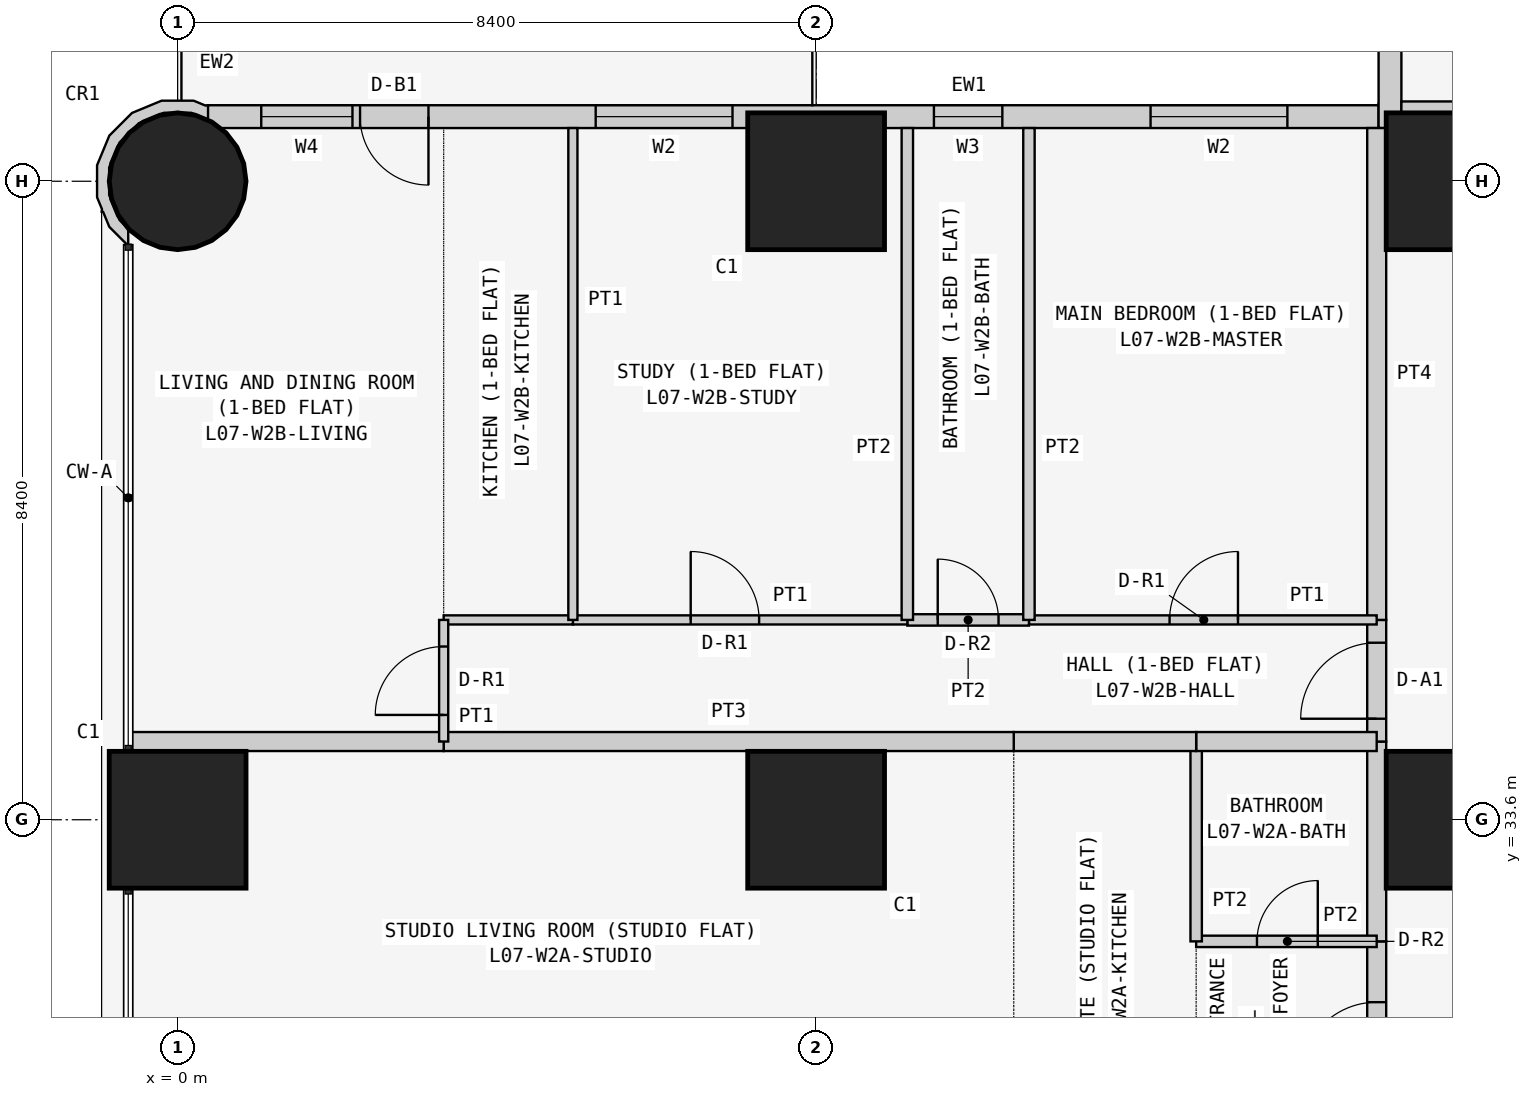
"""IFC4 building model, lengths in metres.
Left out: names, types, materials, properties, quantities, classifications, styles, units other than length and angle.
Written with IfcOpenShell. Run it as: python <this file> out.ifc"""

import sys

from ifc_helpers import new_model, si_unit, direction, frame, frame_2d, origin, origin_2d, place, context, subcontext, project, spatial, polyline, rectangle, circle, outline, extrude, element, fill, save


model = new_model("IFC4")
c1 = context("Model", 3, precision=1e-05, world=origin(), true_north=direction((0.0, 1.0)))
c2 = subcontext(c1, "Body", "Model", "MODEL_VIEW")
j1 = project(units=[si_unit("LENGTHUNIT", "METRE"), si_unit("PLANEANGLEUNIT", "RADIAN")], contexts=[c1])
p1 = place(None, origin())
s1 = spatial("IfcSite", under=j1, at=p1, CompositionType="ELEMENT")
p2 = place(p1, origin())
s2 = spatial("IfcBuilding", under=s1, at=p2, CompositionType="ELEMENT")
p3 = place(p2, frame((0.0, 0.0, 34.5)))
s3 = spatial("IfcBuildingStorey", under=s2, at=p3, CompositionType="ELEMENT", Elevation=34.5)
p4 = place(p3, frame((0.0, 33.6, 0.0), z_axis=(0.0, 0.0, 1.0), x_axis=(1.0, 0.0, 0.0)))
e1 = element("IfcColumn", 1, at=p4, inside=s3, PredefinedType="COLUMN", context=c2, shape_type="SweptSolid", body=[
    extrude(rectangle(XDim=1.8, YDim=1.8, at=origin_2d()), origin(), (0.0, 0.0, 1.0), 3.6),
])
p5 = place(p3, frame((0.0, 42.0, 0.0), z_axis=(0.0, 0.0, 1.0), x_axis=(1.0, 0.0, 0.0)))
e2 = element("IfcColumn", 2, at=p5, inside=s3, PredefinedType="COLUMN", context=c2, shape_type="SweptSolid", body=[
    extrude(circle(Radius=0.9, at=origin_2d()), origin(), (0.0, 0.0, 1.0), 3.6),
])
for number, where, z_axis, x_axis in (
    (3, (8.4, 33.6, 0.0), (0.0, 0.0, 1.0), (1.0, 0.0, 0.0)),
    (4, (8.4, 42.0, 0.0), (0.0, 0.0, 1.0), (1.0, 0.0, 0.0)),
    (5, (16.8, 33.6, 0.0), (0.0, 0.0, 1.0), (1.0, 0.0, 0.0)),
    (6, (16.8, 42.0, 0.0), (0.0, 0.0, 1.0), (1.0, 0.0, 0.0)),
):
    element("IfcColumn", number, at=place(p3, frame(where, z_axis=z_axis, x_axis=x_axis)), inside=s3, PredefinedType="COLUMN", context=c2, shape_type="SweptSolid", body=[
        extrude(rectangle(XDim=1.8, YDim=1.8, at=origin_2d()), origin(), (0.0, 0.0, 1.0), 3.6),
    ])
p6 = place(p3, frame((15.8, 42.85, 0.0), z_axis=(0.0, 0.0, 1.0), x_axis=(-1.0, 0.0, 0.0)))
e7 = element("IfcWall", 7, at=p6, inside=s3, PredefinedType="SOLIDWALL", context=c2, shape_type="SweptSolid", body=[
    extrude(rectangle(XDim=15.4, YDim=0.3, at=frame_2d((7.7, 0.0))), origin(), (0.0, 0.0, 1.0), 3.45),
])
p7 = place(p6, frame((1.2, 0.0, 0.9)))
e8 = element("IfcOpeningElement", 8, at=p7, cuts=e7, PredefinedType="OPENING", context=c2, shape_type="SweptSolid", body=[
    extrude(rectangle(XDim=1.8, YDim=1.5, at=frame_2d((0.9, 0.75))), frame((0.0, 0.16, 0.0), z_axis=(0.0, -1.0, 0.0), x_axis=(1.0, 0.0, 0.0)), (0.0, 0.0, 1.0), 0.32),
])
p8 = place(p6, frame((4.95, 0.0, 1.5)))
e9 = element("IfcOpeningElement", 9, at=p8, cuts=e7, PredefinedType="OPENING", context=c2, shape_type="SweptSolid", body=[
    extrude(rectangle(XDim=0.9, YDim=0.7, at=frame_2d((0.45, 0.35))), frame((0.0, 0.16, 0.0), z_axis=(0.0, -1.0, 0.0), x_axis=(1.0, 0.0, 0.0)), (0.0, 0.0, 1.0), 0.32),
])
p9 = place(p6, frame((8.5, 0.0, 0.9)))
e10 = element("IfcOpeningElement", 10, at=p9, cuts=e7, PredefinedType="OPENING", context=c2, shape_type="SweptSolid", body=[
    extrude(rectangle(XDim=1.8, YDim=1.5, at=frame_2d((0.9, 0.75))), frame((0.0, 0.16, 0.0), z_axis=(0.0, -1.0, 0.0), x_axis=(1.0, 0.0, 0.0)), (0.0, 0.0, 1.0), 0.32),
])
p10 = place(p6, frame((12.5, 0.0, 0.0)))
e11 = element("IfcOpeningElement", 11, at=p10, cuts=e7, PredefinedType="OPENING", context=c2, shape_type="SweptSolid", body=[
    extrude(rectangle(XDim=0.9, YDim=2.4, at=frame_2d((0.45, 1.2))), frame((0.0, 0.16, 0.0), z_axis=(0.0, -1.0, 0.0), x_axis=(1.0, 0.0, 0.0)), (0.0, 0.0, 1.0), 0.32),
])
p11 = place(p6, frame((13.5, 0.0, 0.9)))
e12 = element("IfcOpeningElement", 12, at=p11, cuts=e7, PredefinedType="OPENING", context=c2, shape_type="SweptSolid", body=[
    extrude(rectangle(XDim=1.2, YDim=1.5, at=frame_2d((0.6, 0.75))), frame((0.0, 0.16, 0.0), z_axis=(0.0, -1.0, 0.0), x_axis=(1.0, 0.0, 0.0)), (0.0, 0.0, 1.0), 0.32),
])
p12 = place(p3, frame((15.95, 58.4, 0.0), z_axis=(0.0, 0.0, 1.0), x_axis=(0.0, -1.0, 0.0)))
e13 = element("IfcWall", 13, at=p12, inside=s3, PredefinedType="SOLIDWALL", context=c2, shape_type="SweptSolid", body=[
    extrude(rectangle(XDim=15.7, YDim=0.3, at=frame_2d((7.85, 0.0))), origin(), (0.0, 0.0, 1.0), 3.45),
])
p13 = place(p12, frame((12.4, 0.0, 0.9)))
e14 = element("IfcOpeningElement", 14, at=p13, cuts=e13, PredefinedType="OPENING", context=c2, shape_type="SweptSolid", body=[
    extrude(rectangle(XDim=1.8, YDim=1.5, at=frame_2d((0.9, 0.75))), frame((0.0, 0.16, 0.0), z_axis=(0.0, -1.0, 0.0), x_axis=(1.0, 0.0, 0.0)), (0.0, 0.0, 1.0), 0.32),
])
p14 = place(p12, frame((9.55, 0.0, 1.5)))
e15 = element("IfcOpeningElement", 15, at=p14, cuts=e13, PredefinedType="OPENING", context=c2, shape_type="SweptSolid", body=[
    extrude(rectangle(XDim=0.9, YDim=0.7, at=frame_2d((0.45, 0.35))), frame((0.0, 0.16, 0.0), z_axis=(0.0, -1.0, 0.0), x_axis=(1.0, 0.0, 0.0)), (0.0, 0.0, 1.0), 0.32),
])
p15 = place(p12, frame((5.1, 0.0, 0.9)))
e16 = element("IfcOpeningElement", 16, at=p15, cuts=e13, PredefinedType="OPENING", context=c2, shape_type="SweptSolid", body=[
    extrude(rectangle(XDim=1.8, YDim=1.5, at=frame_2d((0.9, 0.75))), frame((0.0, 0.16, 0.0), z_axis=(0.0, -1.0, 0.0), x_axis=(1.0, 0.0, 0.0)), (0.0, 0.0, 1.0), 0.32),
])
p16 = place(p12, frame((2.0, 0.0, 0.0)))
e17 = element("IfcOpeningElement", 17, at=p16, cuts=e13, PredefinedType="OPENING", context=c2, shape_type="SweptSolid", body=[
    extrude(rectangle(XDim=0.9, YDim=2.4, at=frame_2d((0.45, 1.2))), frame((0.0, 0.16, 0.0), z_axis=(0.0, -1.0, 0.0), x_axis=(1.0, 0.0, 0.0)), (0.0, 0.0, 1.0), 0.32),
])
p17 = place(p12, frame((0.7, 0.0, 0.9)))
e18 = element("IfcOpeningElement", 18, at=p17, cuts=e13, PredefinedType="OPENING", context=c2, shape_type="SweptSolid", body=[
    extrude(rectangle(XDim=1.2, YDim=1.5, at=frame_2d((0.6, 0.75))), frame((0.0, 0.16, 0.0), z_axis=(0.0, -1.0, 0.0), x_axis=(1.0, 0.0, 0.0)), (0.0, 0.0, 1.0), 0.32),
])
p18 = place(p3, frame((0.364, 42.91, 0.0), z_axis=(0.0, 0.0, 1.0), x_axis=(-0.926129809145, 0.377204953059, 0.0)))
e19 = element("IfcWall", 19, at=p18, inside=s3, PredefinedType="SOLIDWALL", context=c2, shape_type="SweptSolid", body=[
    extrude(outline(polyline([(0.36, 1.803), (0.509, 1.741), (0.761, 1.486), (0.896, 1.154), (0.894, 0.795), (0.755, 0.465), (0.5, 0.213), (0.168, 0.078), (-0.1, 0.08), (0.001, -0.097), (0.03, -0.08), (0.199, -0.081), (0.589, 0.078), (0.889, 0.374), (1.053, 0.763), (1.055, 1.185), (0.896, 1.575), (0.778, 1.695), (0.769, 1.728), (0.75, 1.723), (0.6, 1.875), (0.295, 2.003), (0.281, 1.998), (0.36, 1.803)])), origin(), (0.0, 0.0, 1.0), 3.45),
])
p19 = place(p3, frame((16.1, 42.975, 0.0), z_axis=(0.0, 0.0, 1.0), x_axis=(1.0, 0.0, 0.0)))
e20 = element("IfcWall", 20, at=p19, inside=s3, PredefinedType="PARTITIONING", context=c2, shape_type="SweptSolid", body=[
    extrude(rectangle(XDim=11.557, YDim=0.15, at=frame_2d((5.778, 0.0))), origin(), (0.0, 0.0, 1.0), 3.45),
])
p20 = place(p3, frame((15.775, 29.4, 0.0), z_axis=(0.0, 0.0, 1.0), x_axis=(0.0, 1.0, 0.0)))
e21 = element("IfcWall", 21, at=p20, inside=s3, PredefinedType="PARTITIONING", context=c2, shape_type="SweptSolid", body=[
    extrude(rectangle(XDim=2.6, YDim=0.25, at=frame_2d((1.3, 0.0))), origin(), (0.0, 0.0, 1.0), 3.45),
])
p21 = place(p20, frame((0.8, 0.0, 0.0)))
e22 = element("IfcOpeningElement", 22, at=p21, cuts=e21, PredefinedType="OPENING", context=c2, shape_type="SweptSolid", body=[
    extrude(rectangle(XDim=1.0, YDim=2.1, at=frame_2d((0.5, 1.05))), frame((0.0, 0.135, 0.0), z_axis=(0.0, -1.0, 0.0), x_axis=(1.0, 0.0, 0.0)), (0.0, 0.0, 1.0), 0.27),
])
p22 = place(p3, frame((15.775, 32.0, 0.0), z_axis=(0.0, 0.0, 1.0), x_axis=(0.0, 1.0, 0.0)))
e23 = element("IfcWall", 23, at=p22, inside=s3, PredefinedType="PARTITIONING", context=c2, shape_type="SweptSolid", body=[
    extrude(rectangle(XDim=2.629, YDim=0.25, at=frame_2d((1.314, 0.0))), origin(), (0.0, 0.0, 1.0), 3.45),
])
p23 = place(p3, frame((15.775, 34.629, 0.0), z_axis=(0.0, 0.0, 1.0), x_axis=(0.0, 1.0, 0.0)))
e24 = element("IfcWall", 24, at=p23, inside=s3, PredefinedType="PARTITIONING", context=c2, shape_type="SweptSolid", body=[
    extrude(rectangle(XDim=1.6, YDim=0.25, at=frame_2d((0.8, 0.0))), origin(), (0.0, 0.0, 1.0), 3.45),
])
p24 = place(p23, frame((0.3, 0.0, 0.0)))
e25 = element("IfcOpeningElement", 25, at=p24, cuts=e24, PredefinedType="OPENING", context=c2, shape_type="SweptSolid", body=[
    extrude(rectangle(XDim=1.0, YDim=2.1, at=frame_2d((0.5, 1.05))), frame((0.0, 0.135, 0.0), z_axis=(0.0, -1.0, 0.0), x_axis=(1.0, 0.0, 0.0)), (0.0, 0.0, 1.0), 0.27),
])
p25 = place(p3, frame((15.775, 36.229, 0.0), z_axis=(0.0, 0.0, 1.0), x_axis=(0.0, 1.0, 0.0)))
e26 = element("IfcWall", 26, at=p25, inside=s3, PredefinedType="PARTITIONING", context=c2, shape_type="SweptSolid", body=[
    extrude(rectangle(XDim=6.471, YDim=0.25, at=frame_2d((3.235, 0.0))), origin(), (0.0, 0.0, 1.0), 3.45),
])
p26 = place(p3, frame((13.4, 32.0, 0.0), z_axis=(0.0, 0.0, 1.0), x_axis=(1.0, 0.0, 0.0)))
e27 = element("IfcWall", 27, at=p26, inside=s3, PredefinedType="PARTITIONING", context=c2, shape_type="SweptSolid", body=[
    extrude(rectangle(XDim=2.375, YDim=0.15, at=frame_2d((1.188, 0.0))), origin(), (0.0, 0.0, 1.0), 3.45),
])
p27 = place(p26, frame((0.8, 0.0, 0.0)))
e28 = element("IfcOpeningElement", 28, at=p27, cuts=e27, PredefinedType="OPENING", context=c2, shape_type="SweptSolid", body=[
    extrude(rectangle(XDim=0.8, YDim=2.1, at=frame_2d((0.4, 1.05))), frame((0.0, 0.085, 0.0), z_axis=(0.0, -1.0, 0.0), x_axis=(1.0, 0.0, 0.0)), (0.0, 0.0, 1.0), 0.17),
])
p28 = place(p3, frame((13.4, 32.0, 0.0), z_axis=(0.0, 0.0, 1.0), x_axis=(0.0, 1.0, 0.0)))
e29 = element("IfcWall", 29, at=p28, inside=s3, PredefinedType="PARTITIONING", context=c2, shape_type="SweptSolid", body=[
    extrude(rectangle(XDim=2.629, YDim=0.15, at=frame_2d((1.314, 0.0))), origin(), (0.0, 0.0, 1.0), 3.45),
])
p29 = place(p3, frame((13.4, 34.629, 0.0), z_axis=(0.0, 0.0, 1.0), x_axis=(1.0, 0.0, 0.0)))
e30 = element("IfcWall", 30, at=p29, inside=s3, PredefinedType="PARTITIONING", context=c2, shape_type="SweptSolid", body=[
    extrude(rectangle(XDim=2.375, YDim=0.25, at=frame_2d((1.188, 0.0))), origin(), (0.0, 0.0, 1.0), 3.45),
])
p30 = place(p3, frame((11.0, 34.629, 0.0), z_axis=(0.0, 0.0, 1.0), x_axis=(1.0, 0.0, 0.0)))
e31 = element("IfcWall", 31, at=p30, inside=s3, PredefinedType="PARTITIONING", context=c2, shape_type="SweptSolid", body=[
    extrude(rectangle(XDim=2.4, YDim=0.25, at=frame_2d((1.2, 0.0))), origin(), (0.0, 0.0, 1.0), 3.45),
])
p31 = place(p3, frame((3.5, 34.629, 0.0), z_axis=(0.0, 0.0, 1.0), x_axis=(1.0, 0.0, 0.0)))
e32 = element("IfcWall", 32, at=p31, inside=s3, PredefinedType="PARTITIONING", context=c2, shape_type="SweptSolid", body=[
    extrude(rectangle(XDim=7.5, YDim=0.25, at=frame_2d((3.75, 0.0))), origin(), (0.0, 0.0, 1.0), 3.45),
])
p32 = place(p3, frame((-0.65, 34.629, 0.0), z_axis=(0.0, 0.0, 1.0), x_axis=(1.0, 0.0, 0.0)))
e33 = element("IfcWall", 33, at=p32, inside=s3, PredefinedType="PARTITIONING", context=c2, shape_type="SweptSolid", body=[
    extrude(rectangle(XDim=4.15, YDim=0.25, at=frame_2d((2.075, 0.0))), origin(), (0.0, 0.0, 1.0), 3.45),
])
p33 = place(p3, frame((11.2, 36.229, 0.0), z_axis=(0.0, 0.0, 1.0), x_axis=(1.0, 0.0, 0.0)))
e34 = element("IfcWall", 34, at=p33, inside=s3, PredefinedType="PARTITIONING", context=c2, shape_type="SweptSolid", body=[
    extrude(rectangle(XDim=4.575, YDim=0.12, at=frame_2d((2.288, 0.0))), origin(), (0.0, 0.0, 1.0), 3.45),
])
p34 = place(p33, frame((1.85, 0.0, 0.0)))
e35 = element("IfcOpeningElement", 35, at=p34, cuts=e34, PredefinedType="OPENING", context=c2, shape_type="SweptSolid", body=[
    extrude(rectangle(XDim=0.9, YDim=2.1, at=frame_2d((0.45, 1.05))), frame((0.0, 0.07, 0.0), z_axis=(0.0, -1.0, 0.0), x_axis=(1.0, 0.0, 0.0)), (0.0, 0.0, 1.0), 0.14),
])
p35 = place(p3, frame((9.6, 36.229, 0.0), z_axis=(0.0, 0.0, 1.0), x_axis=(1.0, 0.0, 0.0)))
e36 = element("IfcWall", 36, at=p35, inside=s3, PredefinedType="PARTITIONING", context=c2, shape_type="SweptSolid", body=[
    extrude(rectangle(XDim=1.6, YDim=0.15, at=frame_2d((0.8, 0.0))), origin(), (0.0, 0.0, 1.0), 3.45),
])
p36 = place(p35, frame((0.4, 0.0, 0.0)))
e37 = element("IfcOpeningElement", 37, at=p36, cuts=e36, PredefinedType="OPENING", context=c2, shape_type="SweptSolid", body=[
    extrude(rectangle(XDim=0.8, YDim=2.1, at=frame_2d((0.4, 1.05))), frame((0.0, 0.085, 0.0), z_axis=(0.0, -1.0, 0.0), x_axis=(1.0, 0.0, 0.0)), (0.0, 0.0, 1.0), 0.17),
])
p37 = place(p3, frame((5.2, 36.229, 0.0), z_axis=(0.0, 0.0, 1.0), x_axis=(1.0, 0.0, 0.0)))
e38 = element("IfcWall", 38, at=p37, inside=s3, PredefinedType="PARTITIONING", context=c2, shape_type="SweptSolid", body=[
    extrude(rectangle(XDim=4.4, YDim=0.12, at=frame_2d((2.2, 0.0))), origin(), (0.0, 0.0, 1.0), 3.45),
])
p38 = place(p37, frame((1.55, 0.0, 0.0)))
e39 = element("IfcOpeningElement", 39, at=p38, cuts=e38, PredefinedType="OPENING", context=c2, shape_type="SweptSolid", body=[
    extrude(rectangle(XDim=0.9, YDim=2.1, at=frame_2d((0.45, 1.05))), frame((0.0, 0.07, 0.0), z_axis=(0.0, -1.0, 0.0), x_axis=(1.0, 0.0, 0.0)), (0.0, 0.0, 1.0), 0.14),
])
p39 = place(p3, frame((3.5, 36.229, 0.0), z_axis=(0.0, 0.0, 1.0), x_axis=(1.0, 0.0, 0.0)))
e40 = element("IfcWall", 40, at=p39, inside=s3, PredefinedType="PARTITIONING", context=c2, shape_type="SweptSolid", body=[
    extrude(rectangle(XDim=1.7, YDim=0.12, at=frame_2d((0.85, 0.0))), origin(), (0.0, 0.0, 1.0), 3.45),
])
p40 = place(p3, frame((3.5, 34.629, 0.0), z_axis=(0.0, 0.0, 1.0), x_axis=(0.0, 1.0, 0.0)))
e41 = element("IfcWall", 41, at=p40, inside=s3, PredefinedType="PARTITIONING", context=c2, shape_type="SweptSolid", body=[
    extrude(rectangle(XDim=1.6, YDim=0.12, at=frame_2d((0.8, 0.0))), origin(), (0.0, 0.0, 1.0), 3.45),
])
p41 = place(p40, frame((0.35, 0.0, 0.0)))
e42 = element("IfcOpeningElement", 42, at=p41, cuts=e41, PredefinedType="OPENING", context=c2, shape_type="SweptSolid", body=[
    extrude(rectangle(XDim=0.9, YDim=2.1, at=frame_2d((0.45, 1.05))), frame((0.0, 0.07, 0.0), z_axis=(0.0, -1.0, 0.0), x_axis=(1.0, 0.0, 0.0)), (0.0, 0.0, 1.0), 0.14),
])
for number, where, z_axis, x_axis in (
    (43, (11.2, 36.229, 0.0), (0.0, 0.0, 1.0), (0.0, 1.0, 0.0)),
    (44, (9.6, 36.229, 0.0), (0.0, 0.0, 1.0), (0.0, 1.0, 0.0)),
):
    element("IfcWall", number, at=place(p3, frame(where, z_axis=z_axis, x_axis=x_axis)), inside=s3, PredefinedType="PARTITIONING", context=c2, shape_type="SweptSolid", body=[
        extrude(rectangle(XDim=6.471, YDim=0.15, at=frame_2d((3.235, 0.0))), origin(), (0.0, 0.0, 1.0), 3.45),
    ])
p42 = place(p3, frame((5.2, 36.229, 0.0), z_axis=(0.0, 0.0, 1.0), x_axis=(0.0, 1.0, 0.0)))
e45 = element("IfcWall", 45, at=p42, inside=s3, PredefinedType="PARTITIONING", context=c2, shape_type="SweptSolid", body=[
    extrude(rectangle(XDim=6.471, YDim=0.12, at=frame_2d((3.235, 0.0))), origin(), (0.0, 0.0, 1.0), 3.45),
])
p43 = place(p7, origin())
e46 = element("IfcWindow", 46, at=p43, inside=s3, PartitioningType="SINGLE_PANEL", PredefinedType="WINDOW", context=c2, shape_type="SweptSolid", body=[
    extrude(rectangle(XDim=1.8, YDim=1.5, at=frame_2d((0.9, 0.75))), frame((0.0, 0.03, 0.0), z_axis=(0.0, -1.0, 0.0), x_axis=(1.0, 0.0, 0.0)), (0.0, 0.0, 1.0), 0.06),
])
fill(e8, e46)
p44 = place(p8, origin())
e47 = element("IfcWindow", 47, at=p44, inside=s3, PartitioningType="SINGLE_PANEL", PredefinedType="WINDOW", context=c2, shape_type="SweptSolid", body=[
    extrude(rectangle(XDim=0.9, YDim=0.7, at=frame_2d((0.45, 0.35))), frame((0.0, 0.03, 0.0), z_axis=(0.0, -1.0, 0.0), x_axis=(1.0, 0.0, 0.0)), (0.0, 0.0, 1.0), 0.06),
])
fill(e9, e47)
p45 = place(p9, origin())
e48 = element("IfcWindow", 48, at=p45, inside=s3, PartitioningType="SINGLE_PANEL", PredefinedType="WINDOW", context=c2, shape_type="SweptSolid", body=[
    extrude(rectangle(XDim=1.8, YDim=1.5, at=frame_2d((0.9, 0.75))), frame((0.0, 0.03, 0.0), z_axis=(0.0, -1.0, 0.0), x_axis=(1.0, 0.0, 0.0)), (0.0, 0.0, 1.0), 0.06),
])
fill(e10, e48)
p46 = place(p10, origin())
e49 = element("IfcDoor", 49, at=p46, inside=s3, OperationType="SINGLE_SWING_LEFT", PredefinedType="DOOR", context=c2, shape_type="SweptSolid", body=[
    extrude(rectangle(XDim=0.9, YDim=2.4, at=frame_2d((0.45, 1.2))), frame((0.0, 0.025, 0.0), z_axis=(0.0, -1.0, 0.0), x_axis=(1.0, 0.0, 0.0)), (0.0, 0.0, 1.0), 0.05),
])
fill(e11, e49)
p47 = place(p11, origin())
e50 = element("IfcWindow", 50, at=p47, inside=s3, PartitioningType="SINGLE_PANEL", PredefinedType="WINDOW", context=c2, shape_type="SweptSolid", body=[
    extrude(rectangle(XDim=1.2, YDim=1.5, at=frame_2d((0.6, 0.75))), frame((0.0, 0.03, 0.0), z_axis=(0.0, -1.0, 0.0), x_axis=(1.0, 0.0, 0.0)), (0.0, 0.0, 1.0), 0.06),
])
fill(e12, e50)
p48 = place(p21, origin())
e51 = element("IfcDoor", 51, at=p48, inside=s3, OperationType="SINGLE_SWING_LEFT", PredefinedType="DOOR", context=c2, shape_type="SweptSolid", body=[
    extrude(rectangle(XDim=1.0, YDim=2.1, at=frame_2d((0.5, 1.05))), frame((0.0, 0.025, 0.0), z_axis=(0.0, -1.0, 0.0), x_axis=(1.0, 0.0, 0.0)), (0.0, 0.0, 1.0), 0.05),
])
fill(e22, e51)
p49 = place(p27, origin())
e52 = element("IfcDoor", 52, at=p49, inside=s3, OperationType="SINGLE_SWING_RIGHT", PredefinedType="DOOR", context=c2, shape_type="SweptSolid", body=[
    extrude(rectangle(XDim=0.8, YDim=2.1, at=frame_2d((0.4, 1.05))), frame((0.0, 0.025, 0.0), z_axis=(0.0, -1.0, 0.0), x_axis=(1.0, 0.0, 0.0)), (0.0, 0.0, 1.0), 0.05),
])
fill(e28, e52)
p50 = place(p24, origin())
e53 = element("IfcDoor", 53, at=p50, inside=s3, OperationType="SINGLE_SWING_LEFT", PredefinedType="DOOR", context=c2, shape_type="SweptSolid", body=[
    extrude(rectangle(XDim=1.0, YDim=2.1, at=frame_2d((0.5, 1.05))), frame((0.0, 0.025, 0.0), z_axis=(0.0, -1.0, 0.0), x_axis=(1.0, 0.0, 0.0)), (0.0, 0.0, 1.0), 0.05),
])
fill(e25, e53)
p51 = place(p34, origin())
e54 = element("IfcDoor", 54, at=p51, inside=s3, OperationType="SINGLE_SWING_RIGHT", PredefinedType="DOOR", context=c2, shape_type="SweptSolid", body=[
    extrude(rectangle(XDim=0.9, YDim=2.1, at=frame_2d((0.45, 1.05))), frame((0.0, 0.025, 0.0), z_axis=(0.0, -1.0, 0.0), x_axis=(1.0, 0.0, 0.0)), (0.0, 0.0, 1.0), 0.05),
])
fill(e35, e54)
p52 = place(p36, origin())
e55 = element("IfcDoor", 55, at=p52, inside=s3, OperationType="SINGLE_SWING_LEFT", PredefinedType="DOOR", context=c2, shape_type="SweptSolid", body=[
    extrude(rectangle(XDim=0.8, YDim=2.1, at=frame_2d((0.4, 1.05))), frame((0.0, 0.025, 0.0), z_axis=(0.0, -1.0, 0.0), x_axis=(1.0, 0.0, 0.0)), (0.0, 0.0, 1.0), 0.05),
])
fill(e37, e55)
p53 = place(p38, origin())
e56 = element("IfcDoor", 56, at=p53, inside=s3, OperationType="SINGLE_SWING_LEFT", PredefinedType="DOOR", context=c2, shape_type="SweptSolid", body=[
    extrude(rectangle(XDim=0.9, YDim=2.1, at=frame_2d((0.45, 1.05))), frame((0.0, 0.025, 0.0), z_axis=(0.0, -1.0, 0.0), x_axis=(1.0, 0.0, 0.0)), (0.0, 0.0, 1.0), 0.05),
])
fill(e39, e56)
p54 = place(p41, origin())
e57 = element("IfcDoor", 57, at=p54, inside=s3, OperationType="SINGLE_SWING_LEFT", PredefinedType="DOOR", context=c2, shape_type="SweptSolid", body=[
    extrude(rectangle(XDim=0.9, YDim=2.1, at=frame_2d((0.45, 1.05))), frame((0.0, 0.025, 0.0), z_axis=(0.0, -1.0, 0.0), x_axis=(1.0, 0.0, 0.0)), (0.0, 0.0, 1.0), 0.05),
])
fill(e42, e57)
save(model, sys.argv[1])
